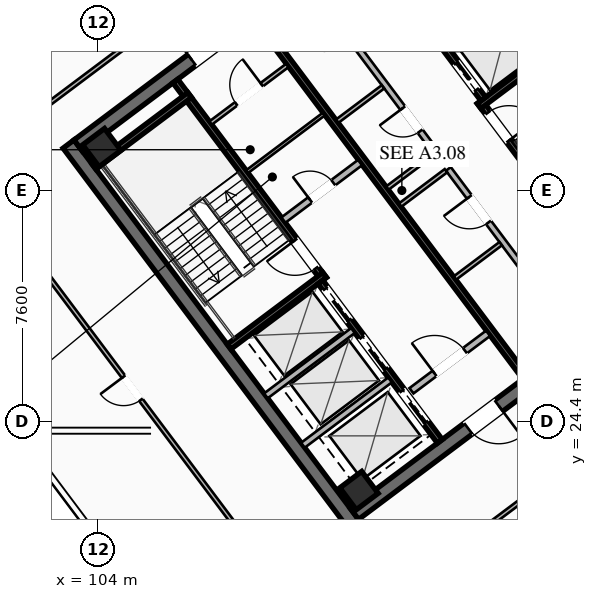
"""IFC4 building model, lengths in metres.
Left out: names, types, materials, properties, quantities, classifications, styles, units other than length and angle.
Written with IfcOpenShell. Run it as: python <this file> out.ifc"""

import sys

from ifc_helpers import new_model, si_unit, direction, frame, frame_2d, origin, origin_2d, place, context, subcontext, project, spatial, rectangle, hollow_rectangle, extrude, element, fill, save


model = new_model("IFC4")
c1 = context("Model", 3, precision=1e-05, world=origin(), true_north=direction((0.0, 1.0)))
c2 = subcontext(c1, "Body", "Model", "MODEL_VIEW")
j1 = project(units=[si_unit("LENGTHUNIT", "METRE"), si_unit("PLANEANGLEUNIT", "RADIAN")], contexts=[c1])
p1 = place(None, origin())
s1 = spatial("IfcSite", under=j1, at=p1, CompositionType="ELEMENT")
p2 = place(p1, origin())
s2 = spatial("IfcBuilding", under=s1, at=p2, CompositionType="ELEMENT")
p3 = place(p2, frame((0.0, 0.0, 259.4)))
s3 = spatial("IfcBuildingStorey", under=s2, at=p3, CompositionType="ELEMENT", Elevation=259.4)
for number, where, z_axis, x_axis in (
    (1, (112.396, 21.047, 0.0), (0.0, 0.0, 1.0), (-0.6, 0.8, 0.0)),
    (2, (115.604, 42.953, 0.0), (0.0, 0.0, 1.0), (0.6, -0.8, 0.0)),
):
    element("IfcWall", number, at=place(p3, frame(where, z_axis=z_axis, x_axis=x_axis)), inside=s3, PredefinedType="SHEAR", context=c2, shape_type="SweptSolid", body=[
        extrude(rectangle(XDim=15.6, YDim=0.45, at=frame_2d((7.8, 0.0))), origin(), (0.0, 0.0, 1.0), 4.0),
    ])
p4 = place(p3, frame((124.649, 30.518, 0.0), z_axis=(0.0, 0.0, 1.0), x_axis=(-0.8, -0.6, 0.0)))
e3 = element("IfcWall", 3, at=p4, inside=s3, PredefinedType="SHEAR", context=c2, shape_type="SweptSolid", body=[
    extrude(rectangle(XDim=15.26, YDim=0.45, at=frame_2d((7.63, 0.0))), origin(), (0.0, 0.0, 1.0), 4.0),
])
p5 = place(p4, frame((9.33, 0.0, 0.0)))
e4 = element("IfcOpeningElement", 4, at=p5, cuts=e3, PredefinedType="OPENING", context=c2, shape_type="SweptSolid", body=[
    extrude(rectangle(XDim=1.25, YDim=2.25, at=frame_2d((0.625, 1.125))), frame((0.0, 0.235, 0.0), z_axis=(0.0, -1.0, 0.0), x_axis=(1.0, 0.0, 0.0)), (0.0, 0.0, 1.0), 0.47),
])
p6 = place(p4, frame((4.28, 0.0, 0.0)))
e5 = element("IfcOpeningElement", 5, at=p6, cuts=e3, PredefinedType="OPENING", context=c2, shape_type="SweptSolid", body=[
    extrude(rectangle(XDim=1.25, YDim=2.25, at=frame_2d((0.625, 1.125))), frame((0.0, 0.235, 0.0), z_axis=(0.0, -1.0, 0.0), x_axis=(1.0, 0.0, 0.0)), (0.0, 0.0, 1.0), 0.47),
])
p7 = place(p3, frame((103.351, 33.482, 0.0), z_axis=(0.0, 0.0, 1.0), x_axis=(0.8, 0.6, 0.0)))
e6 = element("IfcWall", 6, at=p7, inside=s3, PredefinedType="SHEAR", context=c2, shape_type="SweptSolid", body=[
    extrude(rectangle(XDim=15.26, YDim=0.45, at=frame_2d((7.63, 0.0))), origin(), (0.0, 0.0, 1.0), 4.0),
])
p8 = place(p7, frame((4.68, 0.0, 0.0)))
e7 = element("IfcOpeningElement", 7, at=p8, cuts=e6, PredefinedType="OPENING", context=c2, shape_type="SweptSolid", body=[
    extrude(rectangle(XDim=1.25, YDim=2.25, at=frame_2d((0.625, 1.125))), frame((0.0, 0.235, 0.0), z_axis=(0.0, -1.0, 0.0), x_axis=(1.0, 0.0, 0.0)), (0.0, 0.0, 1.0), 0.47),
])
p9 = place(p7, frame((9.73, 0.0, 0.0)))
e8 = element("IfcOpeningElement", 8, at=p9, cuts=e6, PredefinedType="OPENING", context=c2, shape_type="SweptSolid", body=[
    extrude(rectangle(XDim=1.25, YDim=2.25, at=frame_2d((0.625, 1.125))), frame((0.0, 0.235, 0.0), z_axis=(0.0, -1.0, 0.0), x_axis=(1.0, 0.0, 0.0)), (0.0, 0.0, 1.0), 0.47),
])
for number, where, z_axis, x_axis in (
    (9, (112.59, 22.13, 0.0), (0.0, 0.0, 1.0), (0.8, 0.6, 0.0)),
    (10, (104.13, 33.41, 0.0), (0.0, 0.0, 1.0), (0.8, 0.6, 0.0)),
):
    element("IfcColumn", number, at=place(p3, frame(where, z_axis=z_axis, x_axis=x_axis)), inside=s3, PredefinedType="COLUMN", context=c2, shape_type="SweptSolid", body=[
        extrude(hollow_rectangle(XDim=0.9, YDim=0.9, WallThickness=0.04, at=origin_2d()), origin(), (0.0, 0.0, 1.0), 3.7),
    ])
p10 = place(p3, frame((111.44, 29.08, 0.0), z_axis=(0.0, 0.0, 1.0), x_axis=(-0.59999041401, 0.800007189403, 0.0)))
e11 = element("IfcWall", 11, at=p10, inside=s3, PredefinedType="SHEAR", context=c2, shape_type="SweptSolid", body=[
    extrude(rectangle(XDim=8.15, YDim=0.2, at=frame_2d((4.075, 0.0))), origin(), (0.0, 0.0, 1.0), 3.7),
])
p11 = place(p10, frame((0.45, 0.0, 0.0)))
e12 = element("IfcOpeningElement", 12, at=p11, cuts=e11, PredefinedType="OPENING", context=c2, shape_type="SweptSolid", body=[
    extrude(rectangle(XDim=1.15, YDim=2.2, at=frame_2d((0.575, 1.1))), frame((0.0, 0.11, 0.0), z_axis=(0.0, -1.0, 0.0), x_axis=(1.0, 0.0, 0.0)), (0.0, 0.0, 1.0), 0.22),
])
for number, where, z_axis, x_axis in (
    (13, (108.316, 26.862, 0.0), (0.0, 0.0, 1.0), (0.8, 0.6, 0.0)),
    (14, (103.876, 32.782, 0.0), (0.0, 0.0, 1.0), (0.8, 0.6, 0.0)),
):
    element("IfcWall", number, at=place(p3, frame(where, z_axis=z_axis, x_axis=x_axis)), inside=s3, PredefinedType="SHEAR", context=c2, shape_type="SweptSolid", body=[
        extrude(rectangle(XDim=3.93, YDim=0.2, at=frame_2d((1.965, 0.0))), origin(), (0.0, 0.0, 1.0), 3.7),
    ])
p12 = place(p3, frame((116.56, 34.92, 0.0), z_axis=(0.0, 0.0, 1.0), x_axis=(0.59999041401, -0.800007189403, 0.0)))
e15 = element("IfcWall", 15, at=p12, inside=s3, PredefinedType="SHEAR", context=c2, shape_type="SweptSolid", body=[
    extrude(rectangle(XDim=8.15, YDim=0.2, at=frame_2d((4.075, 0.0))), origin(), (0.0, 0.0, 1.0), 3.7),
])
p13 = place(p12, frame((0.45, 0.0, 0.0)))
e16 = element("IfcOpeningElement", 16, at=p13, cuts=e15, PredefinedType="OPENING", context=c2, shape_type="SweptSolid", body=[
    extrude(rectangle(XDim=1.15, YDim=2.2, at=frame_2d((0.575, 1.1))), frame((0.0, 0.11, 0.0), z_axis=(0.0, -1.0, 0.0), x_axis=(1.0, 0.0, 0.0)), (0.0, 0.0, 1.0), 0.22),
])
p14 = place(p3, frame((116.54, 34.78, 0.0), z_axis=(0.0, 0.0, 1.0), x_axis=(0.800014909178, 0.599980120581, 0.0)))
e17 = element("IfcWall", 17, at=p14, inside=s3, PredefinedType="SHEAR", context=c2, shape_type="SweptSolid", body=[
    extrude(rectangle(XDim=3.93, YDim=0.2, at=frame_2d((1.965, 0.0))), origin(), (0.0, 0.0, 1.0), 3.7),
])
p15 = place(p3, frame((118.058, 25.856, 0.0), z_axis=(0.0, 0.0, 1.0), x_axis=(-0.600002657301, 0.799998007018, 0.0)))
e18 = element("IfcWall", 18, at=p15, inside=s3, PredefinedType="SHEAR", context=c2, shape_type="SweptSolid", body=[
    extrude(rectangle(XDim=14.7, YDim=0.2, at=frame_2d((7.35, 0.0))), origin(), (0.0, 0.0, 1.0), 3.7),
])
p16 = place(p3, frame((110.104, 31.028, 0.0), z_axis=(0.0, 0.0, 1.0), x_axis=(0.800018601094, 0.59997519774, 0.0)))
e19 = element("IfcWall", 19, at=p16, inside=s3, PredefinedType="SOLIDWALL", context=c2, shape_type="SweptSolid", body=[
    extrude(rectangle(XDim=3.15, YDim=0.22, at=frame_2d((1.575, 0.0))), origin(), (0.0, 0.0, 1.0), 2.659),
])
p17 = place(p16, frame((1.1, 0.0, 0.0)))
e20 = element("IfcOpeningElement", 20, at=p17, cuts=e19, PredefinedType="OPENING", context=c2, shape_type="SweptSolid", body=[
    extrude(rectangle(XDim=0.95, YDim=2.05, at=frame_2d((0.475, 1.025))), frame((0.0, 0.12, 0.0), z_axis=(0.0, -1.0, 0.0), x_axis=(1.0, 0.0, 0.0)), (0.0, 0.0, 1.0), 0.24),
])
p18 = place(p3, frame((114.316, 25.412, 0.0), z_axis=(0.0, 0.0, 1.0), x_axis=(0.800018601094, 0.59997519774, 0.0)))
e21 = element("IfcWall", 21, at=p18, inside=s3, PredefinedType="SOLIDWALL", context=c2, shape_type="SweptSolid", body=[
    extrude(rectangle(XDim=3.15, YDim=0.22, at=frame_2d((1.575, 0.0))), origin(), (0.0, 0.0, 1.0), 2.659),
])
p19 = place(p18, frame((0.95, 0.0, 0.0)))
e22 = element("IfcOpeningElement", 22, at=p19, cuts=e21, PredefinedType="OPENING", context=c2, shape_type="SweptSolid", body=[
    extrude(rectangle(XDim=1.25, YDim=2.25, at=frame_2d((0.625, 1.125))), frame((0.0, 0.12, 0.0), z_axis=(0.0, -1.0, 0.0), x_axis=(1.0, 0.0, 0.0)), (0.0, 0.0, 1.0), 0.24),
])
p20 = place(p3, frame((115.25, 23.75, 0.0), z_axis=(0.0, 0.0, 1.0), x_axis=(-0.599994036198, 0.800004472816, 0.0)))
e23 = element("IfcWall", 23, at=p20, inside=s3, PredefinedType="SHEAR", context=c2, shape_type="SweptSolid", body=[
    extrude(rectangle(XDim=6.55, YDim=0.2, at=frame_2d((3.275, 0.0))), origin(), (0.0, 0.0, 1.0), 3.7),
])
p21 = place(p20, frame((4.975, 0.0, 0.0)))
e24 = element("IfcOpeningElement", 24, at=p21, cuts=e23, PredefinedType="OPENING", context=c2, shape_type="SweptSolid", body=[
    extrude(rectangle(XDim=1.3, YDim=2.25, at=frame_2d((0.65, 1.125))), frame((0.0, 0.11, 0.0), z_axis=(0.0, -1.0, 0.0), x_axis=(1.0, 0.0, 0.0)), (0.0, 0.0, 1.0), 0.22),
])
p22 = place(p20, frame((2.975, 0.0, 0.0)))
e25 = element("IfcOpeningElement", 25, at=p22, cuts=e23, PredefinedType="OPENING", context=c2, shape_type="SweptSolid", body=[
    extrude(rectangle(XDim=1.3, YDim=2.25, at=frame_2d((0.65, 1.125))), frame((0.0, 0.11, 0.0), z_axis=(0.0, -1.0, 0.0), x_axis=(1.0, 0.0, 0.0)), (0.0, 0.0, 1.0), 0.22),
])
p23 = place(p20, frame((0.775, 0.0, 0.0)))
e26 = element("IfcOpeningElement", 26, at=p23, cuts=e23, PredefinedType="OPENING", context=c2, shape_type="SweptSolid", body=[
    extrude(rectangle(XDim=1.3, YDim=2.25, at=frame_2d((0.65, 1.125))), frame((0.0, 0.11, 0.0), z_axis=(0.0, -1.0, 0.0), x_axis=(1.0, 0.0, 0.0)), (0.0, 0.0, 1.0), 0.22),
])
for number, where, z_axis, x_axis in (
    (27, (110.746, 23.622, 0.0), (0.0, 0.0, 1.0), (0.8, 0.6, 0.0)),
    (28, (109.528, 25.246, 0.0), (0.0, 0.0, 1.0), (0.8, 0.6, 0.0)),
):
    element("IfcWall", number, at=place(p3, frame(where, z_axis=z_axis, x_axis=x_axis)), inside=s3, PredefinedType="SOLIDWALL", context=c2, shape_type="SweptSolid", body=[
        extrude(rectangle(XDim=3.58, YDim=0.2, at=frame_2d((1.79, 0.0))), origin(), (0.0, 0.0, 1.0), 3.7),
    ])
p24 = place(p3, frame((112.75, 40.25, 0.0), z_axis=(0.0, 0.0, 1.0), x_axis=(0.599994036198, -0.800004472816, 0.0)))
e29 = element("IfcWall", 29, at=p24, inside=s3, PredefinedType="SHEAR", context=c2, shape_type="SweptSolid", body=[
    extrude(rectangle(XDim=6.55, YDim=0.2, at=frame_2d((3.275, 0.0))), origin(), (0.0, 0.0, 1.0), 3.7),
])
p25 = place(p24, frame((5.075, 0.0, 0.0)))
e30 = element("IfcOpeningElement", 30, at=p25, cuts=e29, PredefinedType="OPENING", context=c2, shape_type="SweptSolid", body=[
    extrude(rectangle(XDim=1.1, YDim=2.2, at=frame_2d((0.55, 1.1))), frame((0.0, 0.11, 0.0), z_axis=(0.0, -1.0, 0.0), x_axis=(1.0, 0.0, 0.0)), (0.0, 0.0, 1.0), 0.22),
])
p26 = place(p24, frame((3.025, 0.0, 0.0)))
e31 = element("IfcOpeningElement", 31, at=p26, cuts=e29, PredefinedType="OPENING", context=c2, shape_type="SweptSolid", body=[
    extrude(rectangle(XDim=1.1, YDim=2.2, at=frame_2d((0.55, 1.1))), frame((0.0, 0.11, 0.0), z_axis=(0.0, -1.0, 0.0), x_axis=(1.0, 0.0, 0.0)), (0.0, 0.0, 1.0), 0.22),
])
p27 = place(p24, frame((1.025, 0.0, 0.0)))
e32 = element("IfcOpeningElement", 32, at=p27, cuts=e29, PredefinedType="OPENING", context=c2, shape_type="SweptSolid", body=[
    extrude(rectangle(XDim=1.1, YDim=2.2, at=frame_2d((0.55, 1.1))), frame((0.0, 0.11, 0.0), z_axis=(0.0, -1.0, 0.0), x_axis=(1.0, 0.0, 0.0)), (0.0, 0.0, 1.0), 0.22),
])
p28 = place(p3, frame((107.71, 34.22, 0.0), z_axis=(0.0, 0.0, 1.0), x_axis=(0.799981399002, 0.60002480053, 0.0)))
e33 = element("IfcWall", 33, at=p28, inside=s3, PredefinedType="PARTITIONING", context=c2, shape_type="SweptSolid", body=[
    extrude(rectangle(XDim=3.15, YDim=0.135, at=frame_2d((1.575, 0.0))), origin(), (0.0, 0.0, 1.0), 2.659),
])
p29 = place(p28, frame((1.05, 0.0, 0.0)))
e34 = element("IfcOpeningElement", 34, at=p29, cuts=e33, PredefinedType="OPENING", context=c2, shape_type="SweptSolid", body=[
    extrude(rectangle(XDim=1.05, YDim=2.2, at=frame_2d((0.525, 1.1))), frame((0.0, 0.077, 0.0), z_axis=(0.0, -1.0, 0.0), x_axis=(1.0, 0.0, 0.0)), (0.0, 0.0, 1.0), 0.155),
])
p30 = place(p3, frame((108.91, 32.62, 0.0), z_axis=(0.0, 0.0, 1.0), x_axis=(0.800018601094, 0.59997519774, 0.0)))
e35 = element("IfcWall", 35, at=p30, inside=s3, PredefinedType="PARTITIONING", context=c2, shape_type="SweptSolid", body=[
    extrude(rectangle(XDim=3.15, YDim=0.11, at=frame_2d((1.575, 0.0))), origin(), (0.0, 0.0, 1.0), 2.659),
])
p31 = place(p3, frame((119.73, 27.11, 0.0), z_axis=(0.0, 0.0, 1.0), x_axis=(-0.600005580459, 0.799995814625, 0.0)))
e36 = element("IfcWall", 36, at=p31, inside=s3, PredefinedType="SOLIDWALL", context=c2, shape_type="SweptSolid", body=[
    extrude(rectangle(XDim=7.0, YDim=0.2, at=frame_2d((3.5, 0.0))), origin(), (0.0, 0.0, 1.0), 2.659),
])
p32 = place(p31, frame((0.85, 0.0, 0.0)))
e37 = element("IfcOpeningElement", 37, at=p32, cuts=e36, PredefinedType="OPENING", context=c2, shape_type="SweptSolid", body=[
    extrude(rectangle(XDim=0.95, YDim=2.05, at=frame_2d((0.475, 1.025))), frame((0.0, 0.11, 0.0), z_axis=(0.0, -1.0, 0.0), x_axis=(1.0, 0.0, 0.0)), (0.0, 0.0, 1.0), 0.22),
])
p33 = place(p31, frame((4.8, 0.0, 0.0)))
e38 = element("IfcOpeningElement", 38, at=p33, cuts=e36, PredefinedType="OPENING", context=c2, shape_type="SweptSolid", body=[
    extrude(rectangle(XDim=1.05, YDim=2.2, at=frame_2d((0.525, 1.1))), frame((0.0, 0.11, 0.0), z_axis=(0.0, -1.0, 0.0), x_axis=(1.0, 0.0, 0.0)), (0.0, 0.0, 1.0), 0.22),
])
for number, where, z_axis, x_axis in (
    (39, (113.946, 31.522, 0.0), (0.0, 0.0, 1.0), (0.8, 0.6, 0.0)),
    (40, (115.746, 29.122, 0.0), (0.0, 0.0, 1.0), (0.8, 0.6, 0.0)),
):
    element("IfcWall", number, at=place(p3, frame(where, z_axis=z_axis, x_axis=x_axis)), inside=s3, PredefinedType="PARTITIONING", context=c2, shape_type="SweptSolid", body=[
        extrude(rectangle(XDim=1.88, YDim=0.135, at=frame_2d((0.94, 0.0))), origin(), (0.0, 0.0, 1.0), 2.659),
    ])
p34 = place(p3, frame((115.11, 33.27, 0.0), z_axis=(0.0, 0.0, 1.0), x_axis=(-0.600011160345, 0.79999162962, 0.0)))
e41 = element("IfcWall", 41, at=p34, inside=s3, PredefinedType="SOLIDWALL", context=c2, shape_type="SweptSolid", body=[
    extrude(rectangle(XDim=7.0, YDim=0.2, at=frame_2d((3.5, 0.0))), origin(), (0.0, 0.0, 1.0), 2.659),
])
p35 = place(p34, frame((0.85, 0.0, 0.0)))
e42 = element("IfcOpeningElement", 42, at=p35, cuts=e41, PredefinedType="OPENING", context=c2, shape_type="SweptSolid", body=[
    extrude(rectangle(XDim=0.95, YDim=2.05, at=frame_2d((0.475, 1.025))), frame((0.0, 0.11, 0.0), z_axis=(0.0, -1.0, 0.0), x_axis=(1.0, 0.0, 0.0)), (0.0, 0.0, 1.0), 0.22),
])
p36 = place(p34, frame((4.85, 0.0, 0.0)))
e43 = element("IfcOpeningElement", 43, at=p36, cuts=e41, PredefinedType="OPENING", context=c2, shape_type="SweptSolid", body=[
    extrude(rectangle(XDim=0.95, YDim=2.05, at=frame_2d((0.475, 1.025))), frame((0.0, 0.11, 0.0), z_axis=(0.0, -1.0, 0.0), x_axis=(1.0, 0.0, 0.0)), (0.0, 0.0, 1.0), 0.22),
])
p37 = place(p3, frame((113.526, 32.082, 0.0), z_axis=(0.0, 0.0, 1.0), x_axis=(0.800046745961, 0.599937666993, 0.0)))
e44 = element("IfcWall", 44, at=p37, inside=s3, PredefinedType="PARTITIONING", context=c2, shape_type="SweptSolid", body=[
    extrude(rectangle(XDim=1.88, YDim=0.135, at=frame_2d((0.94, 0.0))), origin(), (0.0, 0.0, 1.0), 2.659),
])
p38 = place(p3, frame((111.876, 34.282, 0.0), z_axis=(0.0, 0.0, 1.0), x_axis=(0.8, 0.6, 0.0)))
e45 = element("IfcWall", 45, at=p38, inside=s3, PredefinedType="PARTITIONING", context=c2, shape_type="SweptSolid", body=[
    extrude(rectangle(XDim=1.88, YDim=0.135, at=frame_2d((0.94, 0.0))), origin(), (0.0, 0.0, 1.0), 2.659),
])
p39 = place(p3, frame((99.65, 32.8, 0.0), z_axis=(0.0, 0.0, 1.0), x_axis=(0.8, 0.6, 0.0)))
e46 = element("IfcWall", 46, at=p39, inside=s3, PredefinedType="PARTITIONING", context=c2, shape_type="SweptSolid", body=[
    extrude(rectangle(XDim=23.85, YDim=0.135, at=frame_2d((11.925, 0.0))), origin(), (0.0, 0.0, 1.0), 2.659),
])
p40 = place(p39, frame((6.567, 0.0, 0.0)))
e47 = element("IfcOpeningElement", 47, at=p40, cuts=e46, PredefinedType="OPENING", context=c2, shape_type="SweptSolid", body=[
    extrude(rectangle(XDim=0.95, YDim=2.05, at=frame_2d((0.475, 1.025))), frame((0.0, 0.077, 0.0), z_axis=(0.0, -1.0, 0.0), x_axis=(1.0, 0.0, 0.0)), (0.0, 0.0, 1.0), 0.155),
])
p41 = place(p39, frame((10.788, 0.0, 0.0)))
e48 = element("IfcOpeningElement", 48, at=p41, cuts=e46, PredefinedType="OPENING", context=c2, shape_type="SweptSolid", body=[
    extrude(rectangle(XDim=0.95, YDim=2.05, at=frame_2d((0.475, 1.025))), frame((0.0, 0.077, 0.0), z_axis=(0.0, -1.0, 0.0), x_axis=(1.0, 0.0, 0.0)), (0.0, 0.0, 1.0), 0.155),
])
p42 = place(p3, frame((123.832, 26.224, 0.0), z_axis=(0.0, 0.0, 1.0), x_axis=(-0.799994292853, -0.600007609454, 0.0)))
e49 = element("IfcWall", 49, at=p42, inside=s3, PredefinedType="PARTITIONING", context=c2, shape_type="SweptSolid", body=[
    extrude(rectangle(XDim=15.4, YDim=0.135, at=frame_2d((7.7, 0.0))), origin(), (0.0, 0.0, 1.0), 2.659),
])
p43 = place(p42, frame((3.676, 0.0, 0.0)))
e50 = element("IfcOpeningElement", 50, at=p43, cuts=e49, PredefinedType="OPENING", context=c2, shape_type="SweptSolid", body=[
    extrude(rectangle(XDim=0.95, YDim=2.05, at=frame_2d((0.475, 1.025))), frame((0.0, 0.077, 0.0), z_axis=(0.0, -1.0, 0.0), x_axis=(1.0, 0.0, 0.0)), (0.0, 0.0, 1.0), 0.155),
])
p44 = place(p3, frame((111.464, 17.048, 0.0), z_axis=(0.0, 0.0, 1.0), x_axis=(-0.600003983917, 0.799997012046, 0.0)))
e51 = element("IfcWall", 51, at=p44, inside=s3, PredefinedType="PARTITIONING", context=c2, shape_type="SweptSolid", body=[
    extrude(rectangle(XDim=19.61, YDim=0.135, at=frame_2d((9.805, 0.0))), origin(), (0.0, 0.0, 1.0), 2.659),
])
p45 = place(p44, frame((10.083, 0.0, 0.0)))
e52 = element("IfcOpeningElement", 52, at=p45, cuts=e51, PredefinedType="OPENING", context=c2, shape_type="SweptSolid", body=[
    extrude(rectangle(XDim=0.95, YDim=2.05, at=frame_2d((0.475, 1.025))), frame((0.0, 0.077, 0.0), z_axis=(0.0, -1.0, 0.0), x_axis=(1.0, 0.0, 0.0)), (0.0, 0.0, 1.0), 0.155),
])
p46 = place(p8, origin())
e53 = element("IfcDoor", 53, at=p46, inside=s3, OperationType="SINGLE_SWING_LEFT", PredefinedType="DOOR", context=c2, shape_type="SweptSolid", body=[
    extrude(rectangle(XDim=1.25, YDim=2.25, at=frame_2d((0.625, 1.125))), frame((0.0, 0.025, 0.0), z_axis=(0.0, -1.0, 0.0), x_axis=(1.0, 0.0, 0.0)), (0.0, 0.0, 1.0), 0.05),
])
fill(e7, e53)
p47 = place(p5, origin())
e54 = element("IfcDoor", 54, at=p47, inside=s3, OperationType="SINGLE_SWING_LEFT", PredefinedType="DOOR", context=c2, shape_type="SweptSolid", body=[
    extrude(rectangle(XDim=1.25, YDim=2.25, at=frame_2d((0.625, 1.125))), frame((0.0, 0.025, 0.0), z_axis=(0.0, -1.0, 0.0), x_axis=(1.0, 0.0, 0.0)), (0.0, 0.0, 1.0), 0.05),
])
fill(e4, e54)
p48 = place(p11, origin())
e55 = element("IfcDoor", 55, at=p48, inside=s3, OperationType="SINGLE_SWING_RIGHT", PredefinedType="DOOR", context=c2, shape_type="SweptSolid", body=[
    extrude(rectangle(XDim=1.15, YDim=2.2, at=frame_2d((0.575, 1.1))), frame((0.0, 0.025, 0.0), z_axis=(0.0, -1.0, 0.0), x_axis=(1.0, 0.0, 0.0)), (0.0, 0.0, 1.0), 0.05),
])
fill(e12, e55)
p49 = place(p13, origin())
e56 = element("IfcDoor", 56, at=p49, inside=s3, OperationType="SINGLE_SWING_RIGHT", PredefinedType="DOOR", context=c2, shape_type="SweptSolid", body=[
    extrude(rectangle(XDim=1.15, YDim=2.2, at=frame_2d((0.575, 1.1))), frame((0.0, 0.025, 0.0), z_axis=(0.0, -1.0, 0.0), x_axis=(1.0, 0.0, 0.0)), (0.0, 0.0, 1.0), 0.05),
])
fill(e16, e56)
p50 = place(p19, origin())
e57 = element("IfcDoor", 57, at=p50, inside=s3, OperationType="SINGLE_SWING_LEFT", PredefinedType="DOOR", context=c2, shape_type="SweptSolid", body=[
    extrude(rectangle(XDim=1.25, YDim=2.25, at=frame_2d((0.625, 1.125))), frame((0.0, 0.025, 0.0), z_axis=(0.0, -1.0, 0.0), x_axis=(1.0, 0.0, 0.0)), (0.0, 0.0, 1.0), 0.05),
])
fill(e22, e57)
p51 = place(p29, origin())
e58 = element("IfcDoor", 58, at=p51, inside=s3, OperationType="SINGLE_SWING_RIGHT", PredefinedType="DOOR", context=c2, shape_type="SweptSolid", body=[
    extrude(rectangle(XDim=1.05, YDim=2.2, at=frame_2d((0.525, 1.1))), frame((0.0, 0.025, 0.0), z_axis=(0.0, -1.0, 0.0), x_axis=(1.0, 0.0, 0.0)), (0.0, 0.0, 1.0), 0.05),
])
fill(e34, e58)
p52 = place(p17, origin())
e59 = element("IfcDoor", 59, at=p52, inside=s3, OperationType="SINGLE_SWING_LEFT", PredefinedType="DOOR", context=c2, shape_type="SweptSolid", body=[
    extrude(rectangle(XDim=0.95, YDim=2.05, at=frame_2d((0.475, 1.025))), frame((0.0, 0.025, 0.0), z_axis=(0.0, -1.0, 0.0), x_axis=(1.0, 0.0, 0.0)), (0.0, 0.0, 1.0), 0.05),
])
fill(e20, e59)
p53 = place(p33, origin())
e60 = element("IfcDoor", 60, at=p53, inside=s3, OperationType="SINGLE_SWING_RIGHT", PredefinedType="DOOR", context=c2, shape_type="SweptSolid", body=[
    extrude(rectangle(XDim=1.05, YDim=2.2, at=frame_2d((0.525, 1.1))), frame((0.0, 0.025, 0.0), z_axis=(0.0, -1.0, 0.0), x_axis=(1.0, 0.0, 0.0)), (0.0, 0.0, 1.0), 0.05),
])
fill(e38, e60)
p54 = place(p35, origin())
e61 = element("IfcDoor", 61, at=p54, inside=s3, OperationType="SINGLE_SWING_RIGHT", PredefinedType="DOOR", context=c2, shape_type="SweptSolid", body=[
    extrude(rectangle(XDim=0.95, YDim=2.05, at=frame_2d((0.475, 1.025))), frame((0.0, 0.025, 0.0), z_axis=(0.0, -1.0, 0.0), x_axis=(1.0, 0.0, 0.0)), (0.0, 0.0, 1.0), 0.05),
])
fill(e42, e61)
p55 = place(p45, origin())
e62 = element("IfcDoor", 62, at=p55, inside=s3, OperationType="SINGLE_SWING_RIGHT", PredefinedType="DOOR", context=c2, shape_type="SweptSolid", body=[
    extrude(rectangle(XDim=0.95, YDim=2.05, at=frame_2d((0.475, 1.025))), frame((0.0, 0.025, 0.0), z_axis=(0.0, -1.0, 0.0), x_axis=(1.0, 0.0, 0.0)), (0.0, 0.0, 1.0), 0.05),
])
fill(e52, e62)
p56 = place(p21, origin())
e63 = element("IfcDoor", 63, at=p56, inside=s3, OperationType="SLIDING_TO_LEFT", PredefinedType="DOOR", context=c2, shape_type="SweptSolid", body=[
    extrude(rectangle(XDim=1.3, YDim=2.25, at=frame_2d((0.65, 1.125))), frame((0.0, 0.025, 0.0), z_axis=(0.0, -1.0, 0.0), x_axis=(1.0, 0.0, 0.0)), (0.0, 0.0, 1.0), 0.05),
])
fill(e24, e63)
p57 = place(p22, origin())
e64 = element("IfcDoor", 64, at=p57, inside=s3, OperationType="SLIDING_TO_LEFT", PredefinedType="DOOR", context=c2, shape_type="SweptSolid", body=[
    extrude(rectangle(XDim=1.3, YDim=2.25, at=frame_2d((0.65, 1.125))), frame((0.0, 0.025, 0.0), z_axis=(0.0, -1.0, 0.0), x_axis=(1.0, 0.0, 0.0)), (0.0, 0.0, 1.0), 0.05),
])
fill(e25, e64)
p58 = place(p23, origin())
e65 = element("IfcDoor", 65, at=p58, inside=s3, OperationType="SLIDING_TO_LEFT", PredefinedType="DOOR", context=c2, shape_type="SweptSolid", body=[
    extrude(rectangle(XDim=1.3, YDim=2.25, at=frame_2d((0.65, 1.125))), frame((0.0, 0.025, 0.0), z_axis=(0.0, -1.0, 0.0), x_axis=(1.0, 0.0, 0.0)), (0.0, 0.0, 1.0), 0.05),
])
fill(e26, e65)
p59 = place(p25, origin())
e66 = element("IfcDoor", 66, at=p59, inside=s3, OperationType="SLIDING_TO_LEFT", PredefinedType="DOOR", context=c2, shape_type="SweptSolid", body=[
    extrude(rectangle(XDim=1.1, YDim=2.2, at=frame_2d((0.55, 1.1))), frame((0.0, 0.025, 0.0), z_axis=(0.0, -1.0, 0.0), x_axis=(1.0, 0.0, 0.0)), (0.0, 0.0, 1.0), 0.05),
])
fill(e30, e66)
save(model, sys.argv[1])
